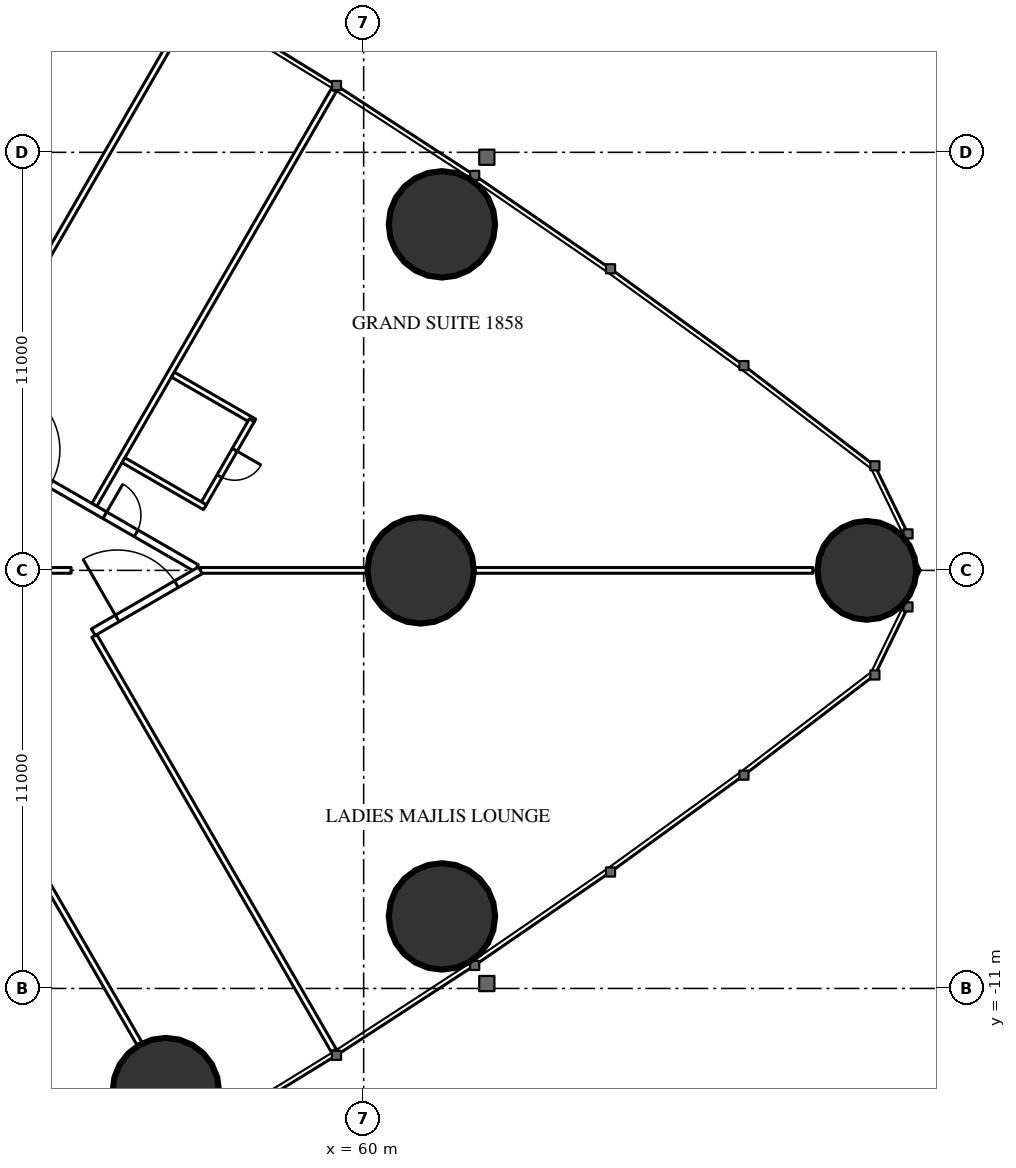
"""IFC4 building model, lengths in metres.
Left out: names, types, materials, properties, quantities, classifications, styles, units other than length and angle.
Written with IfcOpenShell. Run it as: python <this file> out.ifc"""

import sys

from ifc_helpers import new_model, si_unit, direction, frame, frame_2d, origin, origin_2d, place, context, subcontext, project, spatial, rectangle, hollow_circle, extrude, element, fill, save


model = new_model("IFC4")
c1 = context("Model", 3, precision=1e-05, world=origin(), true_north=direction((0.0, 1.0)))
c2 = subcontext(c1, "Body", "Model", "MODEL_VIEW")
j1 = project(units=[si_unit("LENGTHUNIT", "METRE"), si_unit("PLANEANGLEUNIT", "RADIAN")], contexts=[c1])
p1 = place(None, origin())
s1 = spatial("IfcSite", under=j1, at=p1, CompositionType="ELEMENT")
p2 = place(p1, origin())
s2 = spatial("IfcBuilding", under=s1, at=p2, CompositionType="ELEMENT")
p3 = place(p2, frame((0.0, 0.0, 70.5)))
s3 = spatial("IfcBuildingStorey", under=s2, at=p3, CompositionType="ELEMENT", Elevation=70.5)
p4 = place(p3, frame((73.239, 0.0, 0.0), z_axis=(0.0, 0.0, 1.0), x_axis=(1.0, 0.0, 0.0)))
e1 = element("IfcColumn", 1, at=p4, inside=s3, PredefinedType="COLUMN", context=c2, shape_type="SweptSolid", body=[
    extrude(hollow_circle(Radius=1.3, WallThickness=0.1, at=origin_2d()), origin(), (0.0, 0.0, 1.0), 3.5),
])
for number, where, z_axis, x_axis in (
    (2, (62.059, 9.105, 0.0), (0.0, 0.0, 1.0), (1.0, 0.0, 0.0)),
    (3, (54.795, -13.701, 0.0), (0.0, 0.0, 1.0), (1.0, 0.0, 0.0)),
    (4, (62.059, -9.105, 0.0), (0.0, 0.0, 1.0), (1.0, 0.0, 0.0)),
):
    element("IfcColumn", number, at=place(p3, frame(where, z_axis=z_axis, x_axis=x_axis)), inside=s3, PredefinedType="COLUMN", context=c2, shape_type="SweptSolid", body=[
        extrude(hollow_circle(Radius=1.4, WallThickness=0.12, at=origin_2d()), origin(), (0.0, 0.0, 1.0), 3.5),
    ])
p5 = place(p3, frame((61.5, 0.0, 0.0), z_axis=(0.0, 0.0, 1.0), x_axis=(1.0, 0.0, 0.0)))
e5 = element("IfcColumn", 5, at=p5, inside=s3, PredefinedType="COLUMN", context=c2, shape_type="SweptSolid", body=[
    extrude(hollow_circle(Radius=1.4, WallThickness=0.1, at=origin_2d()), origin(), (0.0, 0.0, 1.0), 3.5),
])
p6 = place(p3, frame((49.159, -3.893, 0.0), z_axis=(0.0, 0.0, 1.0), x_axis=(0.499998773722, -0.866026111775, 0.0)))
e6 = element("IfcWall", 6, at=p6, inside=s3, PredefinedType="PARTITIONING", context=c2, shape_type="SweptSolid", body=[
    extrude(rectangle(XDim=9.892, YDim=0.15, at=frame_2d((4.946, 0.0))), origin(), (0.0, 0.0, 1.0), 2.25),
])
p7 = place(p3, frame((52.915, -1.725, 0.0), z_axis=(0.0, 0.0, 1.0), x_axis=(0.499997163113, -0.866027041656, 0.0)))
e7 = element("IfcWall", 7, at=p7, inside=s3, PredefinedType="PARTITIONING", context=c2, shape_type="SweptSolid", body=[
    extrude(rectangle(XDim=12.591, YDim=0.15, at=frame_2d((6.295, 0.0))), origin(), (0.0, 0.0, 1.0), 3.25),
])
p8 = place(p3, frame((49.159, 3.893, 0.0), z_axis=(0.0, 0.0, 1.0), x_axis=(0.499995664361, 0.866027906952, 0.0)))
e8 = element("IfcWall", 8, at=p8, inside=s3, PredefinedType="PARTITIONING", context=c2, shape_type="SweptSolid", body=[
    extrude(rectangle(XDim=12.711, YDim=0.15, at=frame_2d((6.356, 0.0))), origin(), (0.0, 0.0, 1.0), 3.25),
])
p9 = place(p3, frame((52.915, 1.725, 0.0), z_axis=(0.0, 0.0, 1.0), x_axis=(0.499997163113, 0.866027041656, 0.0)))
e9 = element("IfcWall", 9, at=p9, inside=s3, PredefinedType="PARTITIONING", context=c2, shape_type="SweptSolid", body=[
    extrude(rectangle(XDim=12.591, YDim=0.15, at=frame_2d((6.295, 0.0))), origin(), (0.0, 0.0, 1.0), 3.25),
])
p10 = place(p3, frame((55.702, 0.0, 0.0), z_axis=(0.0, 0.0, 1.0), x_axis=(1.0, 0.0, 0.0)))
e10 = element("IfcWall", 10, at=p10, inside=s3, PredefinedType="PARTITIONING", context=c2, shape_type="SweptSolid", body=[
    extrude(rectangle(XDim=16.117, YDim=0.15, at=frame_2d((8.059, 0.0))), origin(), (0.0, 0.0, 1.0), 2.25),
])
p11 = place(p3, frame((36.834, 10.894, 0.0), z_axis=(0.0, 0.0, 1.0), x_axis=(0.866028157229, -0.499995230863, 0.0)))
e11 = element("IfcWall", 11, at=p11, inside=s3, PredefinedType="PARTITIONING", context=c2, shape_type="SweptSolid", body=[
    extrude(rectangle(XDim=21.667, YDim=0.2, at=frame_2d((10.833, 0.0))), origin(), (0.0, 0.0, 1.0), 3.25),
])
p12 = place(p11, frame((18.885, 0.0, 0.0)))
e12 = element("IfcOpeningElement", 12, at=p12, cuts=e11, PredefinedType="OPENING", context=c2, shape_type="SweptSolid", body=[
    extrude(rectangle(XDim=0.95, YDim=2.2, at=frame_2d((0.475, 1.1))), frame((0.0, 0.11, 0.0), z_axis=(0.0, -1.0, 0.0), x_axis=(1.0, 0.0, 0.0)), (0.0, 0.0, 1.0), 0.22),
])
p13 = place(p11, frame((15.443, 0.0, 0.0)))
e13 = element("IfcOpeningElement", 13, at=p13, cuts=e11, PredefinedType="OPENING", context=c2, shape_type="SweptSolid", body=[
    extrude(rectangle(XDim=1.8, YDim=2.2, at=frame_2d((0.9, 1.1))), frame((0.0, 0.11, 0.0), z_axis=(0.0, -1.0, 0.0), x_axis=(1.0, 0.0, 0.0)), (0.0, 0.0, 1.0), 0.22),
])
p14 = place(p11, frame((12.562, 0.0, 0.0)))
e14 = element("IfcOpeningElement", 14, at=p14, cuts=e11, PredefinedType="OPENING", context=c2, shape_type="SweptSolid", body=[
    extrude(rectangle(XDim=0.95, YDim=2.2, at=frame_2d((0.475, 1.1))), frame((0.0, 0.11, 0.0), z_axis=(0.0, -1.0, 0.0), x_axis=(1.0, 0.0, 0.0)), (0.0, 0.0, 1.0), 0.22),
])
p15 = place(p11, frame((4.292, 0.0, 0.0)))
e15 = element("IfcOpeningElement", 15, at=p15, cuts=e11, PredefinedType="OPENING", context=c2, shape_type="SweptSolid", body=[
    extrude(rectangle(XDim=1.0, YDim=2.2, at=frame_2d((0.5, 1.1))), frame((0.0, 0.11, 0.0), z_axis=(0.0, -1.0, 0.0), x_axis=(1.0, 0.0, 0.0)), (0.0, 0.0, 1.0), 0.22),
])
p16 = place(p3, frame((52.886, -1.626, 0.0), z_axis=(0.0, 0.0, 1.0), x_axis=(0.866030540913, 0.499991102127, 0.0)))
e16 = element("IfcWall", 16, at=p16, inside=s3, PredefinedType="PARTITIONING", context=c2, shape_type="SweptSolid", body=[
    extrude(rectangle(XDim=3.251, YDim=0.2, at=frame_2d((1.626, 0.0))), origin(), (0.0, 0.0, 1.0), 3.25),
])
p17 = place(p16, frame((0.726, 0.0, 0.0)))
e17 = element("IfcOpeningElement", 17, at=p17, cuts=e16, PredefinedType="OPENING", context=c2, shape_type="SweptSolid", body=[
    extrude(rectangle(XDim=1.8, YDim=2.2, at=frame_2d((0.9, 1.1))), frame((0.0, 0.11, 0.0), z_axis=(0.0, -1.0, 0.0), x_axis=(1.0, 0.0, 0.0)), (0.0, 0.0, 1.0), 0.22),
])
p18 = place(p3, frame((54.98, 5.151, 0.0), z_axis=(0.0, 0.0, 1.0), x_axis=(0.86604923931, -0.499958713387, 0.0)))
e18 = element("IfcWall", 18, at=p18, inside=s3, PredefinedType="PARTITIONING", context=c2, shape_type="SweptSolid", body=[
    extrude(rectangle(XDim=2.475, YDim=0.15, at=frame_2d((1.237, 0.0))), origin(), (0.0, 0.0, 1.0), 3.25),
])
p19 = place(p3, frame((55.758, 1.7, 0.0), z_axis=(0.0, 0.0, 1.0), x_axis=(0.500006934395, 0.866021400173, 0.0)))
e19 = element("IfcWall", 19, at=p19, inside=s3, PredefinedType="PARTITIONING", context=c2, shape_type="SweptSolid", body=[
    extrude(rectangle(XDim=2.6, YDim=0.15, at=frame_2d((1.3, 0.0))), origin(), (0.0, 0.0, 1.0), 3.25),
])
p20 = place(p19, frame((0.9, 0.0, 0.0)))
e20 = element("IfcOpeningElement", 20, at=p20, cuts=e19, PredefinedType="OPENING", context=c2, shape_type="SweptSolid", body=[
    extrude(rectangle(XDim=0.8, YDim=2.2, at=frame_2d((0.4, 1.1))), frame((0.0, 0.085, 0.0), z_axis=(0.0, -1.0, 0.0), x_axis=(1.0, 0.0, 0.0)), (0.0, 0.0, 1.0), 0.17),
])
p21 = place(p3, frame((53.68, 2.9, 0.0), z_axis=(0.0, 0.0, 1.0), x_axis=(0.866006523861, -0.500032699561, 0.0)))
e21 = element("IfcWall", 21, at=p21, inside=s3, PredefinedType="PARTITIONING", context=c2, shape_type="SweptSolid", body=[
    extrude(rectangle(XDim=2.475, YDim=0.15, at=frame_2d((1.237, 0.0))), origin(), (0.0, 0.0, 1.0), 3.25),
])
p22 = place(p3, frame((44.575, 0.0, 0.0), z_axis=(0.0, 0.0, 1.0), x_axis=(1.0, 0.0, 0.0)))
e22 = element("IfcWall", 22, at=p22, inside=s3, PredefinedType="PARTITIONING", context=c2, shape_type="SweptSolid", body=[
    extrude(rectangle(XDim=7.727, YDim=0.15, at=frame_2d((3.864, 0.0))), origin(), (0.0, 0.0, 1.0), 2.25),
])
p23 = place(p17, origin())
e23 = element("IfcDoor", 23, at=p23, inside=s3, OperationType="DOUBLE_DOOR_SINGLE_SWING", PredefinedType="DOOR", context=c2, shape_type="SweptSolid", body=[
    extrude(rectangle(XDim=1.8, YDim=2.2, at=frame_2d((0.9, 1.1))), frame((0.0, 0.025, 0.0), z_axis=(0.0, -1.0, 0.0), x_axis=(1.0, 0.0, 0.0)), (0.0, 0.0, 1.0), 0.05),
])
fill(e17, e23)
p24 = place(p20, origin())
e24 = element("IfcDoor", 24, at=p24, inside=s3, OperationType="SINGLE_SWING_RIGHT", PredefinedType="DOOR", context=c2, shape_type="SweptSolid", body=[
    extrude(rectangle(XDim=0.8, YDim=2.2, at=frame_2d((0.4, 1.1))), frame((0.0, 0.025, 0.0), z_axis=(0.0, -1.0, 0.0), x_axis=(1.0, 0.0, 0.0)), (0.0, 0.0, 1.0), 0.05),
])
fill(e20, e24)
p25 = place(p12, origin())
e25 = element("IfcDoor", 25, at=p25, inside=s3, OperationType="SINGLE_SWING_LEFT", PredefinedType="DOOR", context=c2, shape_type="SweptSolid", body=[
    extrude(rectangle(XDim=0.95, YDim=2.2, at=frame_2d((0.475, 1.1))), frame((0.0, 0.025, 0.0), z_axis=(0.0, -1.0, 0.0), x_axis=(1.0, 0.0, 0.0)), (0.0, 0.0, 1.0), 0.05),
])
fill(e12, e25)
save(model, sys.argv[1])
